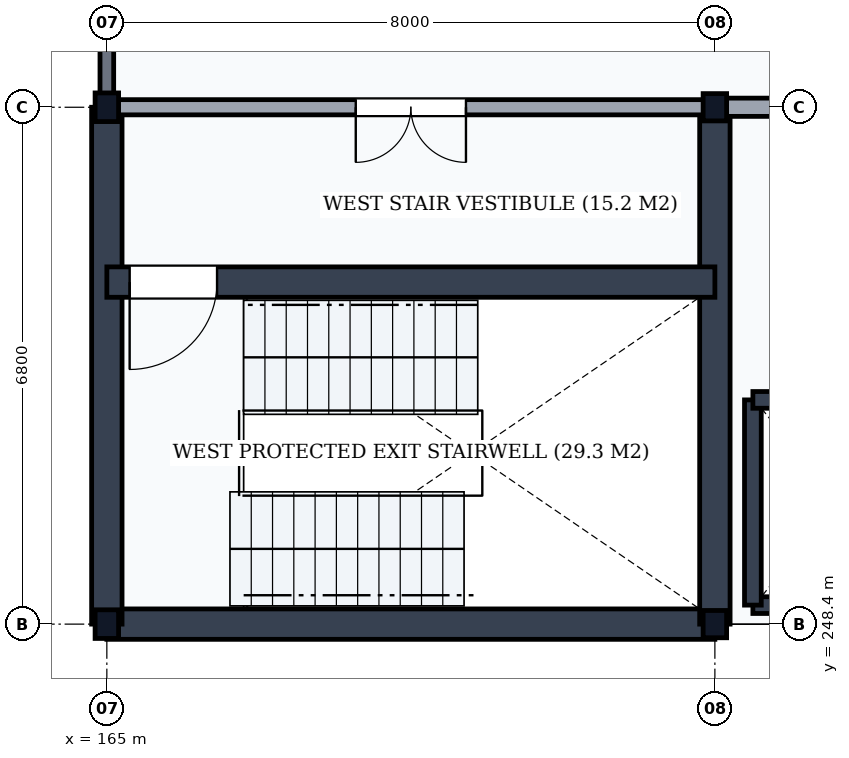
"""IFC4 building model, lengths in metres.
Left out: names, types, materials, properties, quantities, classifications, styles, units other than length and angle.
Written with IfcOpenShell. Run it as: python <this file> out.ifc"""

import sys

from ifc_helpers import new_model, si_unit, direction, frame, frame_2d, origin, origin_2d, place, context, subcontext, project, spatial, rectangle, i_section, extrude, element, fill, save


model = new_model("IFC4")
c1 = context("Model", 3, precision=1e-05, world=origin(), true_north=direction((0.0, 1.0)))
c2 = subcontext(c1, "Body", "Model", "MODEL_VIEW")
j1 = project(units=[si_unit("LENGTHUNIT", "METRE"), si_unit("PLANEANGLEUNIT", "RADIAN")], contexts=[c1])
p1 = place(None, origin())
s1 = spatial("IfcSite", under=j1, at=p1, CompositionType="ELEMENT")
p2 = place(p1, origin())
s2 = spatial("IfcBuilding", under=s1, at=p2, CompositionType="ELEMENT")
p3 = place(p2, frame((0.0, 0.0, 47.7)))
s3 = spatial("IfcBuildingStorey", under=s2, at=p3, CompositionType="ELEMENT", Elevation=47.7)
for number, where, z_axis, x_axis in (
    (1, (165.0, 248.4, 0.0), (0.0, 0.0, 1.0), (1.0, 0.0, 0.0)),
    (2, (165.0, 255.2, 0.0), (0.0, 0.0, 1.0), (1.0, 0.0, 0.0)),
):
    element("IfcColumn", number, at=place(p3, frame(where, z_axis=z_axis, x_axis=x_axis)), inside=s3, PredefinedType="COLUMN", context=c2, shape_type="SweptSolid", body=[
        extrude(i_section(OverallWidth=0.309, OverallDepth=0.377, WebThickness=0.021, FlangeThickness=0.04, FilletRadius=0.027, at=origin_2d()), origin(), (0.0, 0.0, 1.0), 3.9),
    ])
for number, where, z_axis, x_axis in (
    (3, (173.0, 248.4, 0.0), (0.0, 0.0, 1.0), (1.0, 0.0, 0.0)),
    (4, (173.0, 255.2, 0.0), (0.0, 0.0, 1.0), (1.0, 0.0, 0.0)),
):
    element("IfcColumn", number, at=place(p3, frame(where, z_axis=z_axis, x_axis=x_axis)), inside=s3, PredefinedType="COLUMN", context=c2, shape_type="SweptSolid", body=[
        extrude(i_section(OverallWidth=0.309, OverallDepth=0.359, WebThickness=0.021, FlangeThickness=0.04, FilletRadius=0.027, at=origin_2d()), origin(), (0.0, 0.0, 1.0), 3.9),
    ])
p4 = place(p3, frame((165.0, 255.206, 0.0), z_axis=(0.0, 0.0, 1.0), x_axis=(0.0, 1.0, 0.0)))
e5 = element("IfcWall", 5, at=p4, inside=s3, PredefinedType="SOLIDWALL", context=c2, shape_type="SweptSolid", body=[
    extrude(rectangle(XDim=7.588, YDim=0.18, at=frame_2d((3.794, 0.0))), origin(), (0.0, 0.0, 1.0), 3.338),
])
p5 = place(p3, frame((165.0, 248.4, 0.0), z_axis=(0.0, 0.0, 1.0), x_axis=(1.0, 0.0, 0.0)))
e6 = element("IfcWall", 6, at=p5, inside=s3, PredefinedType="SHEAR", context=c2, shape_type="SweptSolid", body=[
    extrude(rectangle(XDim=8.0, YDim=0.4, at=frame_2d((4.0, 0.0))), origin(), (0.0, 0.0, 1.0), 3.61),
])
for number, where, z_axis, x_axis in (
    (7, (165.0, 248.4, 0.0), (0.0, 0.0, 1.0), (0.0, 1.0, 0.0)),
    (8, (173.0, 248.4, 0.0), (0.0, 0.0, 1.0), (0.0, 1.0, 0.0)),
):
    element("IfcWall", number, at=place(p3, frame(where, z_axis=z_axis, x_axis=x_axis)), inside=s3, PredefinedType="SHEAR", context=c2, shape_type="SweptSolid", body=[
        extrude(rectangle(XDim=6.8, YDim=0.4, at=frame_2d((3.4, 0.0))), origin(), (0.0, 0.0, 1.0), 3.61),
    ])
p6 = place(p3, frame((165.0, 252.9, 0.0), z_axis=(0.0, 0.0, 1.0), x_axis=(1.0, 0.0, 0.0)))
e9 = element("IfcWall", 9, at=p6, inside=s3, PredefinedType="SHEAR", context=c2, shape_type="SweptSolid", body=[
    extrude(rectangle(XDim=8.0, YDim=0.4, at=frame_2d((4.0, 0.0))), origin(), (0.0, 0.0, 1.0), 3.61),
])
p7 = place(p6, frame((0.3, 0.0, 0.0)))
e10 = element("IfcOpeningElement", 10, at=p7, cuts=e9, PredefinedType="OPENING", context=c2, shape_type="SweptSolid", body=[
    extrude(rectangle(XDim=1.15, YDim=2.15, at=frame_2d((0.575, 1.075))), frame((0.0, 0.215, 0.0), z_axis=(0.0, -1.0, 0.0), x_axis=(1.0, 0.0, 0.0)), (0.0, 0.0, 1.0), 0.43),
])
p8 = place(p3, frame((165.0, 255.2, 0.0), z_axis=(0.0, 0.0, 1.0), x_axis=(1.0, 0.0, 0.0)))
e11 = element("IfcWall", 11, at=p8, inside=s3, PredefinedType="PARTITIONING", context=c2, shape_type="SweptSolid", body=[
    extrude(rectangle(XDim=8.0, YDim=0.2, at=frame_2d((4.0, 0.0))), origin(), (0.0, 0.0, 1.0), 3.108),
])
p9 = place(p8, frame((3.275, 0.0, 0.0)))
e12 = element("IfcOpeningElement", 12, at=p9, cuts=e11, PredefinedType="OPENING", context=c2, shape_type="SweptSolid", body=[
    extrude(rectangle(XDim=1.45, YDim=2.2, at=frame_2d((0.725, 1.1))), frame((0.0, 0.115, 0.0), z_axis=(0.0, -1.0, 0.0), x_axis=(1.0, 0.0, 0.0)), (0.0, 0.0, 1.0), 0.23),
])
p10 = place(p3, frame((173.5, 248.65, 0.0), z_axis=(0.0, 0.0, 1.0), x_axis=(1.0, 0.0, 0.0)))
e13 = element("IfcWall", 13, at=p10, inside=s3, PredefinedType="SHEAR", context=c2, shape_type="SweptSolid", body=[
    extrude(rectangle(XDim=2.2, YDim=0.22, at=frame_2d((1.1, 0.0))), origin(), (0.0, 0.0, 1.0), 3.61),
])
p11 = place(p3, frame((173.5, 248.65, 0.0), z_axis=(0.0, 0.0, 1.0), x_axis=(0.0, 1.0, 0.0)))
e14 = element("IfcWall", 14, at=p11, inside=s3, PredefinedType="SHEAR", context=c2, shape_type="SweptSolid", body=[
    extrude(rectangle(XDim=2.7, YDim=0.22, at=frame_2d((1.35, 0.0))), origin(), (0.0, 0.0, 1.0), 3.61),
])
p12 = place(p3, frame((173.5, 251.35, 0.0), z_axis=(0.0, 0.0, 1.0), x_axis=(1.0, 0.0, 0.0)))
e15 = element("IfcWall", 15, at=p12, inside=s3, PredefinedType="SHEAR", context=c2, shape_type="SweptSolid", body=[
    extrude(rectangle(XDim=2.2, YDim=0.22, at=frame_2d((1.1, 0.0))), origin(), (0.0, 0.0, 1.0), 3.61),
])
p13 = place(p12, frame((0.55, 0.0, 0.0)))
e16 = element("IfcOpeningElement", 16, at=p13, cuts=e15, PredefinedType="OPENING", context=c2, shape_type="SweptSolid", body=[
    extrude(rectangle(XDim=1.1, YDim=2.15, at=frame_2d((0.55, 1.075))), frame((0.0, 0.125, 0.0), z_axis=(0.0, -1.0, 0.0), x_axis=(1.0, 0.0, 0.0)), (0.0, 0.0, 1.0), 0.25),
])
p14 = place(p3, frame((173.0, 255.2, 0.0), z_axis=(0.0, 0.0, 1.0), x_axis=(1.0, 0.0, 0.0)))
e17 = element("IfcWall", 17, at=p14, inside=s3, PredefinedType="PARTITIONING", context=c2, shape_type="SweptSolid", body=[
    extrude(rectangle(XDim=8.0, YDim=0.24, at=frame_2d((4.0, 0.0))), origin(), (0.0, 0.0, 1.0), 3.108),
])
p15 = place(p14, frame((1.05, 0.0, 0.0)))
e18 = element("IfcOpeningElement", 18, at=p15, cuts=e17, PredefinedType="OPENING", context=c2, shape_type="SweptSolid", body=[
    extrude(rectangle(XDim=1.0, YDim=2.1, at=frame_2d((0.5, 1.05))), frame((0.0, 0.135, 0.0), z_axis=(0.0, -1.0, 0.0), x_axis=(1.0, 0.0, 0.0)), (0.0, 0.0, 1.0), 0.27),
])
p16 = place(p14, frame((4.6, 0.0, 0.0)))
e19 = element("IfcOpeningElement", 19, at=p16, cuts=e17, PredefinedType="OPENING", context=c2, shape_type="SweptSolid", body=[
    extrude(rectangle(XDim=1.6, YDim=2.25, at=frame_2d((0.8, 1.125))), frame((0.0, 0.135, 0.0), z_axis=(0.0, -1.0, 0.0), x_axis=(1.0, 0.0, 0.0)), (0.0, 0.0, 1.0), 0.27),
])
p17 = place(p7, frame((1.15, 0.0, 0.0), z_axis=(0.0, 0.0, 1.0), x_axis=(-1.0, 0.0, 0.0)))
e20 = element("IfcDoor", 20, at=p17, inside=s3, OperationType="SINGLE_SWING_RIGHT", PredefinedType="DOOR", context=c2, shape_type="SweptSolid", body=[
    extrude(rectangle(XDim=1.15, YDim=2.15, at=frame_2d((0.575, 1.075))), frame((0.0, 0.025, 0.0), z_axis=(0.0, -1.0, 0.0), x_axis=(1.0, 0.0, 0.0)), (0.0, 0.0, 1.0), 0.05),
])
fill(e10, e20)
p18 = place(p9, frame((1.45, 0.0, 0.0), z_axis=(0.0, 0.0, 1.0), x_axis=(-1.0, 0.0, 0.0)))
e21 = element("IfcDoor", 21, at=p18, inside=s3, OperationType="DOUBLE_DOOR_SINGLE_SWING", PredefinedType="DOOR", context=c2, shape_type="SweptSolid", body=[
    extrude(rectangle(XDim=1.45, YDim=2.2, at=frame_2d((0.725, 1.1))), frame((0.0, 0.025, 0.0), z_axis=(0.0, -1.0, 0.0), x_axis=(1.0, 0.0, 0.0)), (0.0, 0.0, 1.0), 0.05),
])
fill(e12, e21)
save(model, sys.argv[1])
